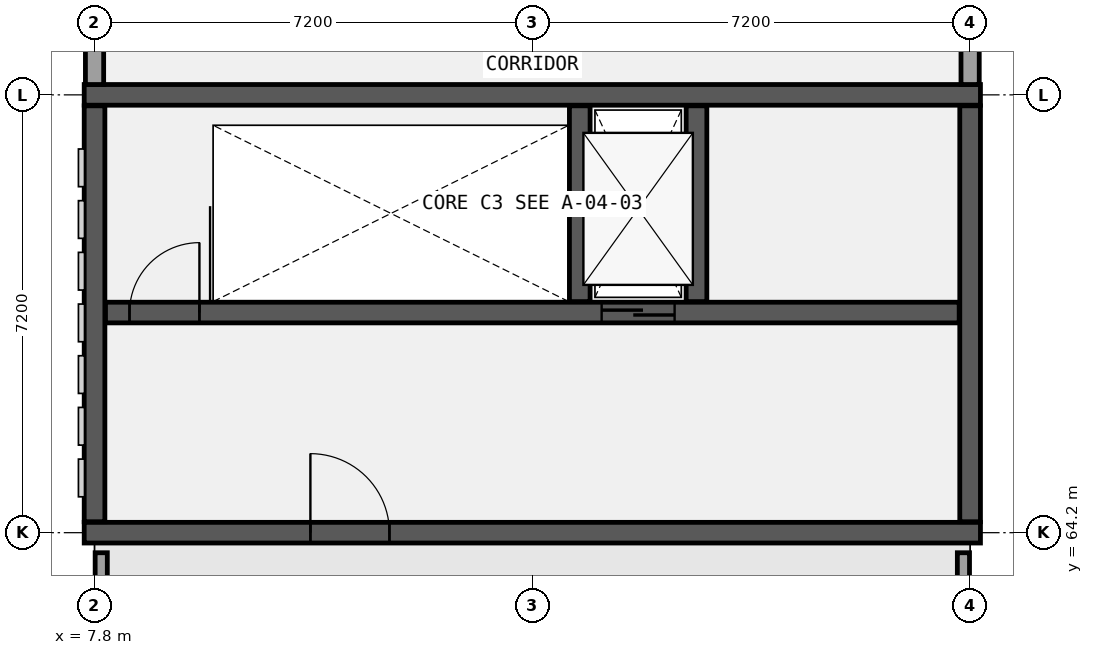
"""IFC4 building model, lengths in metres.
Left out: names, types, materials, properties, quantities, classifications, styles, units other than length and angle.
Written with IfcOpenShell. Run it as: python <this file> out.ifc"""

import sys

from ifc_helpers import new_model, si_unit, direction, frame, frame_2d, origin, place, context, subcontext, project, spatial, rectangle, extrude, element, fill, save


model = new_model("IFC4")
c1 = context("Model", 3, precision=1e-05, world=origin(), true_north=direction((0.0, 1.0)))
c2 = subcontext(c1, "Body", "Model", "MODEL_VIEW")
j1 = project(units=[si_unit("LENGTHUNIT", "METRE"), si_unit("PLANEANGLEUNIT", "RADIAN")], contexts=[c1])
p1 = place(None, origin())
s1 = spatial("IfcSite", under=j1, at=p1, CompositionType="ELEMENT")
p2 = place(p1, origin())
s2 = spatial("IfcBuilding", under=s1, at=p2, CompositionType="ELEMENT")
p3 = place(p2, frame((0.0, 0.0, 22.2)))
s3 = spatial("IfcBuildingStorey", under=s2, at=p3, CompositionType="ELEMENT", Elevation=22.2)
p4 = place(p3, frame((7.63, 71.4, 0.0), z_axis=(0.0, 0.0, 1.0), x_axis=(1.0, 0.0, 0.0)))
e1 = element("IfcWall", 1, at=p4, inside=s3, PredefinedType="SHEAR", context=c2, shape_type="SweptSolid", body=[
    extrude(rectangle(XDim=14.74, YDim=0.34, at=frame_2d((7.37, 0.0))), origin(), (0.0, 0.0, 1.0), 4.2),
])
p5 = place(p3, frame((7.63, 64.2, 0.0), z_axis=(0.0, 0.0, 1.0), x_axis=(1.0, 0.0, 0.0)))
e2 = element("IfcWall", 2, at=p5, inside=s3, PredefinedType="SHEAR", context=c2, shape_type="SweptSolid", body=[
    extrude(rectangle(XDim=14.74, YDim=0.34, at=frame_2d((7.37, 0.0))), origin(), (0.0, 0.0, 1.0), 4.2),
])
p6 = place(p5, frame((3.72, 0.0, 0.0)))
e3 = element("IfcOpeningElement", 3, at=p6, cuts=e2, PredefinedType="OPENING", context=c2, shape_type="SweptSolid", body=[
    extrude(rectangle(XDim=1.3, YDim=2.2, at=frame_2d((0.65, 1.1))), frame((0.0, 0.18, 0.0), z_axis=(0.0, -1.0, 0.0), x_axis=(1.0, 0.0, 0.0)), (0.0, 0.0, 1.0), 0.36),
])
for number, where, z_axis, x_axis in (
    (4, (7.8, 64.38, 0.0), (0.0, 0.0, 1.0), (0.0, 1.0, 0.0)),
    (5, (22.2, 64.38, 0.0), (0.0, 0.0, 1.0), (0.0, 1.0, 0.0)),
):
    element("IfcWall", number, at=place(p3, frame(where, z_axis=z_axis, x_axis=x_axis)), inside=s3, PredefinedType="SHEAR", context=c2, shape_type="SweptSolid", body=[
        extrude(rectangle(XDim=6.84, YDim=0.34, at=frame_2d((3.42, 0.0))), origin(), (0.0, 0.0, 1.0), 4.2),
    ])
p7 = place(p3, frame((7.98, 67.82, 0.0), z_axis=(0.0, 0.0, 1.0), x_axis=(1.0, 0.0, 0.0)))
e6 = element("IfcWall", 6, at=p7, inside=s3, PredefinedType="SHEAR", context=c2, shape_type="SweptSolid", body=[
    extrude(rectangle(XDim=14.04, YDim=0.34, at=frame_2d((7.02, 0.0))), origin(), (0.0, 0.0, 1.0), 4.2),
])
p8 = place(p7, frame((8.16, 0.0, 0.0)))
e7 = element("IfcOpeningElement", 7, at=p8, cuts=e6, PredefinedType="OPENING", context=c2, shape_type="SweptSolid", body=[
    extrude(rectangle(XDim=1.2, YDim=2.15, at=frame_2d((0.6, 1.075))), frame((0.0, 0.18, 0.0), z_axis=(0.0, -1.0, 0.0), x_axis=(1.0, 0.0, 0.0)), (0.0, 0.0, 1.0), 0.36),
])
p9 = place(p7, frame((0.395, 0.0, 0.0)))
e8 = element("IfcOpeningElement", 8, at=p9, cuts=e6, PredefinedType="OPENING", context=c2, shape_type="SweptSolid", body=[
    extrude(rectangle(XDim=1.15, YDim=2.15, at=frame_2d((0.575, 1.075))), frame((0.0, 0.18, 0.0), z_axis=(0.0, -1.0, 0.0), x_axis=(1.0, 0.0, 0.0)), (0.0, 0.0, 1.0), 0.36),
])
for number, where, z_axis, x_axis in (
    (9, (15.78, 68.0, 0.0), (0.0, 0.0, 1.0), (0.0, 1.0, 0.0)),
    (10, (17.7, 68.0, 0.0), (0.0, 0.0, 1.0), (0.0, 1.0, 0.0)),
):
    element("IfcWall", number, at=place(p3, frame(where, z_axis=z_axis, x_axis=x_axis)), inside=s3, PredefinedType="SHEAR", context=c2, shape_type="SweptSolid", body=[
        extrude(rectangle(XDim=3.22, YDim=0.34, at=frame_2d((1.61, 0.0))), origin(), (0.0, 0.0, 1.0), 4.2),
    ])
p10 = place(p3, frame((22.2, 71.57, 0.0), z_axis=(0.0, 0.0, 1.0), x_axis=(0.0, 1.0, 0.0)))
e11 = element("IfcWall", 11, at=p10, inside=s3, PredefinedType="SOLIDWALL", context=c2, shape_type="SweptSolid", body=[
    extrude(rectangle(XDim=6.88, YDim=0.3, at=frame_2d((3.44, 0.0))), origin(), (0.0, 0.0, 1.0), 3.12),
])
p11 = place(p10, frame((2.79, 0.0, 1.0)))
e12 = element("IfcOpeningElement", 12, at=p11, cuts=e11, PredefinedType="OPENING", context=c2, shape_type="SweptSolid", body=[
    extrude(rectangle(XDim=1.3, YDim=1.4, at=frame_2d((0.65, 0.7))), frame((0.0, 0.16, 0.0), z_axis=(0.0, -1.0, 0.0), x_axis=(1.0, 0.0, 0.0)), (0.0, 0.0, 1.0), 0.32),
])
p12 = place(p3, frame((7.8, 78.45, 0.0), z_axis=(0.0, 0.0, 1.0), x_axis=(0.0, -1.0, 0.0)))
e13 = element("IfcWall", 13, at=p12, inside=s3, PredefinedType="SOLIDWALL", context=c2, shape_type="SweptSolid", body=[
    extrude(rectangle(XDim=6.88, YDim=0.3, at=frame_2d((3.44, 0.0))), origin(), (0.0, 0.0, 1.0), 3.17),
])
p13 = place(p12, frame((2.54, 0.0, 1.0)))
e14 = element("IfcOpeningElement", 14, at=p13, cuts=e13, PredefinedType="OPENING", context=c2, shape_type="SweptSolid", body=[
    extrude(rectangle(XDim=1.8, YDim=1.65, at=frame_2d((0.9, 0.825))), frame((0.0, 0.16, 0.0), z_axis=(0.0, -1.0, 0.0), x_axis=(1.0, 0.0, 0.0)), (0.0, 0.0, 1.0), 0.32),
])
for number, where, z_axis, x_axis in (
    (15, (7.91, 57.22, 0.0), (0.0, 0.0, 1.0), (0.0, 1.0, 0.0)),
    (16, (22.09, 63.87, 0.0), (0.0, 0.0, 1.0), (0.0, -1.0, 0.0)),
):
    element("IfcWall", number, at=place(p3, frame(where, z_axis=z_axis, x_axis=x_axis)), inside=s3, PredefinedType="PARAPET", context=c2, shape_type="SweptSolid", body=[
        extrude(rectangle(XDim=6.65, YDim=0.2, at=frame_2d((3.325, 0.0))), origin(), (0.0, 0.0, 1.0), 1.12),
    ])
p14 = place(p8, frame((1.2, 0.0, 0.0), z_axis=(0.0, 0.0, 1.0), x_axis=(-1.0, 0.0, 0.0)))
e17 = element("IfcDoor", 17, at=p14, inside=s3, OperationType="DOUBLE_DOOR_SLIDING", PredefinedType="DOOR", context=c2, shape_type="SweptSolid", body=[
    extrude(rectangle(XDim=1.2, YDim=2.15, at=frame_2d((0.6, 1.075))), frame((0.0, 0.025, 0.0), z_axis=(0.0, -1.0, 0.0), x_axis=(1.0, 0.0, 0.0)), (0.0, 0.0, 1.0), 0.05),
])
fill(e7, e17)
p15 = place(p9, origin())
e18 = element("IfcDoor", 18, at=p15, inside=s3, OperationType="SINGLE_SWING_RIGHT", PredefinedType="DOOR", context=c2, shape_type="SweptSolid", body=[
    extrude(rectangle(XDim=1.15, YDim=2.15, at=frame_2d((0.575, 1.075))), frame((0.0, 0.025, 0.0), z_axis=(0.0, -1.0, 0.0), x_axis=(1.0, 0.0, 0.0)), (0.0, 0.0, 1.0), 0.05),
])
fill(e8, e18)
p16 = place(p6, frame((1.3, 0.0, 0.0), z_axis=(0.0, 0.0, 1.0), x_axis=(-1.0, 0.0, 0.0)))
e19 = element("IfcDoor", 19, at=p16, inside=s3, OperationType="SINGLE_SWING_LEFT", PredefinedType="DOOR", context=c2, shape_type="SweptSolid", body=[
    extrude(rectangle(XDim=1.3, YDim=2.2, at=frame_2d((0.65, 1.1))), frame((0.0, 0.025, 0.0), z_axis=(0.0, -1.0, 0.0), x_axis=(1.0, 0.0, 0.0)), (0.0, 0.0, 1.0), 0.05),
])
fill(e3, e19)
save(model, sys.argv[1])
